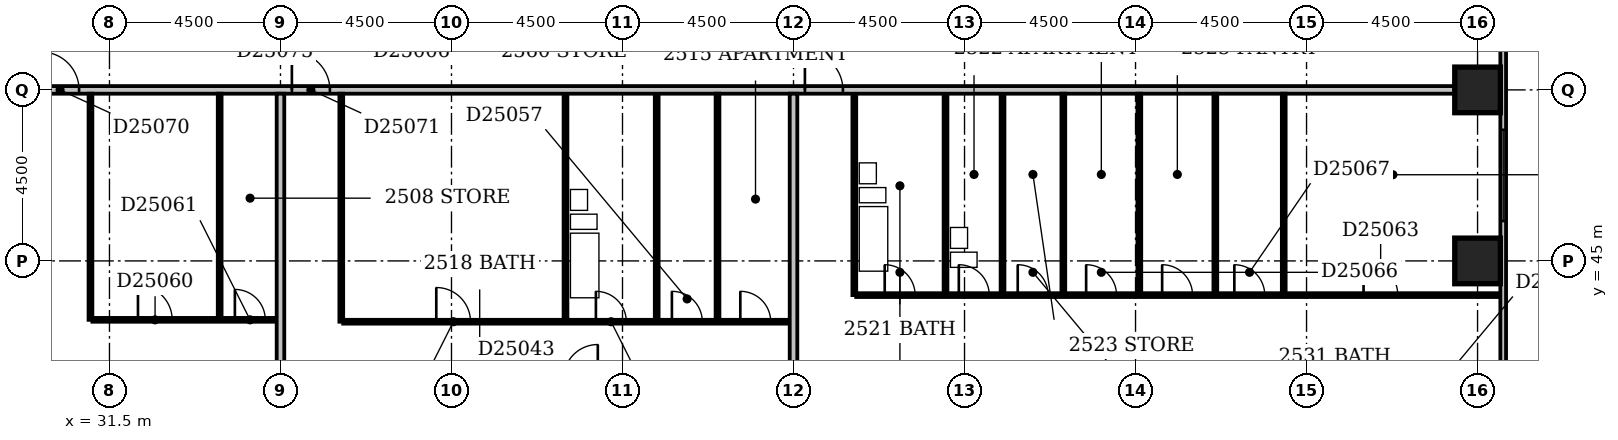
"""IFC4 building model, lengths in metres.
Left out: names, types, materials, properties, quantities, classifications, styles, units other than length and angle.
Written with IfcOpenShell. Run it as: python <this file> out.ifc"""

import sys

from ifc_helpers import new_model, si_unit, direction, frame, frame_2d, origin, origin_2d, place, context, subcontext, project, spatial, rectangle, extrude, element, fill, save


model = new_model("IFC4")
c1 = context("Model", 3, precision=1e-05, world=origin(), true_north=direction((0.0, 1.0)))
c2 = subcontext(c1, "Body", "Model", "MODEL_VIEW")
j1 = project(units=[si_unit("LENGTHUNIT", "METRE"), si_unit("PLANEANGLEUNIT", "RADIAN")], contexts=[c1])
p1 = place(None, origin())
s1 = spatial("IfcSite", under=j1, at=p1, CompositionType="ELEMENT")
p2 = place(p1, origin())
s2 = spatial("IfcBuilding", under=s1, at=p2, CompositionType="ELEMENT")
p3 = place(p2, frame((0.0, 0.0, 101.0)))
s3 = spatial("IfcBuildingStorey", under=s2, at=p3, CompositionType="ELEMENT", Elevation=101.0)
for number, where, z_axis, x_axis in (
    (1, (67.5, 45.0, -0.3), (0.0, 0.0, 1.0), (1.0, 0.0, 0.0)),
    (2, (67.5, 49.5, -0.3), (0.0, 0.0, 1.0), (1.0, 0.0, 0.0)),
):
    element("IfcColumn", number, at=place(p3, frame(where, z_axis=z_axis, x_axis=x_axis)), inside=s3, PredefinedType="COLUMN", context=c2, shape_type="SweptSolid", body=[
        extrude(rectangle(XDim=1.2, YDim=1.2, at=origin_2d()), origin(), (0.0, 0.0, 1.0), 3.6),
    ])
p4 = place(p3, frame((68.175, 35.4, 0.0), z_axis=(0.0, 0.0, 1.0), x_axis=(0.0, 1.0, 0.0)))
e3 = element("IfcWall", 3, at=p4, inside=s3, PredefinedType="STANDARD", context=c2, shape_type="SweptSolid", body=[
    extrude(rectangle(XDim=23.85, YDim=0.15, at=frame_2d((11.925, 0.0))), origin(), (0.0, 0.0, 1.0), 2.7),
])
p5 = place(p4, frame((1.65, 0.0, 0.6)))
e4 = element("IfcOpeningElement", 4, at=p5, cuts=e3, PredefinedType="OPENING", context=c2, shape_type="SweptSolid", body=[
    extrude(rectangle(XDim=2.4, YDim=1.8, at=frame_2d((1.2, 0.9))), frame((0.0, 0.087, 0.0), z_axis=(0.0, -1.0, 0.0), x_axis=(1.0, 0.0, 0.0)), (0.0, 0.0, 1.0), 0.174),
])
p6 = place(p4, frame((10.65, 0.0, 0.6)))
e5 = element("IfcOpeningElement", 5, at=p6, cuts=e3, PredefinedType="OPENING", context=c2, shape_type="SweptSolid", body=[
    extrude(rectangle(XDim=2.4, YDim=1.8, at=frame_2d((1.2, 0.9))), frame((0.0, 0.087, 0.0), z_axis=(0.0, -1.0, 0.0), x_axis=(1.0, 0.0, 0.0)), (0.0, 0.0, 1.0), 0.174),
])
p7 = place(p4, frame((20.653, 0.0, 0.6)))
e6 = element("IfcOpeningElement", 6, at=p7, cuts=e3, PredefinedType="OPENING", context=c2, shape_type="SweptSolid", body=[
    extrude(rectangle(XDim=1.5, YDim=1.8, at=frame_2d((0.75, 0.9))), frame((0.0, 0.087, 0.0), z_axis=(0.0, -1.0, 0.0), x_axis=(1.0, 0.0, 0.0)), (0.0, 0.0, 1.0), 0.174),
])
p8 = place(p3, frame((36.0, 36.6, 0.0), z_axis=(0.0, 0.0, 1.0), x_axis=(0.0, 1.0, 0.0)))
e7 = element("IfcWall", 7, at=p8, inside=s3, PredefinedType="PARTITIONING", context=c2, shape_type="SweptSolid", body=[
    extrude(rectangle(XDim=12.8, YDim=0.2, at=frame_2d((6.4, 0.0))), origin(), (0.0, 0.0, 1.0), 2.4),
])
p9 = place(p3, frame((49.5, 36.6, 0.0), z_axis=(0.0, 0.0, 1.0), x_axis=(0.0, 1.0, 0.0)))
e8 = element("IfcWall", 8, at=p9, inside=s3, PredefinedType="PARTITIONING", context=c2, shape_type="SweptSolid", body=[
    extrude(rectangle(XDim=12.8, YDim=0.2, at=frame_2d((6.4, 0.0))), origin(), (0.0, 0.0, 1.0), 3.3),
])
p10 = place(p3, frame((37.6, 43.4, 0.0), z_axis=(0.0, 0.0, 1.0), x_axis=(0.0, 1.0, 0.0)))
e9 = element("IfcWall", 9, at=p10, inside=s3, PredefinedType="PARTITIONING", context=c2, shape_type="SweptSolid", body=[
    extrude(rectangle(XDim=6.0, YDim=0.1, at=frame_2d((3.0, 0.0))), origin(), (0.0, 0.0, 1.0), 3.3),
])
p11 = place(p3, frame((37.65, 43.4, 0.0), z_axis=(0.0, 0.0, 1.0), x_axis=(1.0, 0.0, 0.0)))
e10 = element("IfcWall", 10, at=p11, inside=s3, PredefinedType="PARTITIONING", context=c2, shape_type="SweptSolid", body=[
    extrude(rectangle(XDim=11.75, YDim=0.1, at=frame_2d((5.875, 0.0))), origin(), (0.0, 0.0, 1.0), 3.3),
])
p12 = place(p11, frame((6.65, 0.0, 0.0)))
e11 = element("IfcOpeningElement", 11, at=p12, cuts=e10, PredefinedType="OPENING", context=c2, shape_type="SweptSolid", body=[
    extrude(rectangle(XDim=0.8, YDim=2.1, at=frame_2d((0.4, 1.05))), frame((0.0, 0.062, 0.0), z_axis=(0.0, -1.0, 0.0), x_axis=(1.0, 0.0, 0.0)), (0.0, 0.0, 1.0), 0.124),
])
p13 = place(p11, frame((2.45, 0.0, 0.0)))
e12 = element("IfcOpeningElement", 12, at=p13, cuts=e10, PredefinedType="OPENING", context=c2, shape_type="SweptSolid", body=[
    extrude(rectangle(XDim=0.9, YDim=2.1, at=frame_2d((0.45, 1.05))), frame((0.0, 0.062, 0.0), z_axis=(0.0, -1.0, 0.0), x_axis=(1.0, 0.0, 0.0)), (0.0, 0.0, 1.0), 0.124),
])
p14 = place(p11, frame((8.65, 0.0, 0.0)))
e13 = element("IfcOpeningElement", 13, at=p14, cuts=e10, PredefinedType="OPENING", context=c2, shape_type="SweptSolid", body=[
    extrude(rectangle(XDim=0.8, YDim=2.1, at=frame_2d((0.4, 1.05))), frame((0.0, 0.062, 0.0), z_axis=(0.0, -1.0, 0.0), x_axis=(1.0, 0.0, 0.0)), (0.0, 0.0, 1.0), 0.124),
])
p15 = place(p11, frame((10.45, 0.0, 0.0)))
e14 = element("IfcOpeningElement", 14, at=p15, cuts=e10, PredefinedType="OPENING", context=c2, shape_type="SweptSolid", body=[
    extrude(rectangle(XDim=0.8, YDim=2.1, at=frame_2d((0.4, 1.05))), frame((0.0, 0.062, 0.0), z_axis=(0.0, -1.0, 0.0), x_axis=(1.0, 0.0, 0.0)), (0.0, 0.0, 1.0), 0.124),
])
p16 = place(p3, frame((31.0, 43.45, 0.0), z_axis=(0.0, 0.0, 1.0), x_axis=(0.0, 1.0, 0.0)))
e15 = element("IfcWall", 15, at=p16, inside=s3, PredefinedType="PARTITIONING", context=c2, shape_type="SweptSolid", body=[
    extrude(rectangle(XDim=5.95, YDim=0.1, at=frame_2d((2.975, 0.0))), origin(), (0.0, 0.0, 1.0), 3.3),
])
p17 = place(p3, frame((31.05, 43.45, 0.0), z_axis=(0.0, 0.0, 1.0), x_axis=(1.0, 0.0, 0.0)))
e16 = element("IfcWall", 16, at=p17, inside=s3, PredefinedType="PARTITIONING", context=c2, shape_type="SweptSolid", body=[
    extrude(rectangle(XDim=4.85, YDim=0.1, at=frame_2d((2.425, 0.0))), origin(), (0.0, 0.0, 1.0), 3.3),
])
p18 = place(p17, frame((1.2, 0.0, 0.0)))
e17 = element("IfcOpeningElement", 17, at=p18, cuts=e16, PredefinedType="OPENING", context=c2, shape_type="SweptSolid", body=[
    extrude(rectangle(XDim=0.9, YDim=2.1, at=frame_2d((0.45, 1.05))), frame((0.0, 0.062, 0.0), z_axis=(0.0, -1.0, 0.0), x_axis=(1.0, 0.0, 0.0)), (0.0, 0.0, 1.0), 0.124),
])
p19 = place(p17, frame((3.75, 0.0, 0.0)))
e18 = element("IfcOpeningElement", 18, at=p19, cuts=e16, PredefinedType="OPENING", context=c2, shape_type="SweptSolid", body=[
    extrude(rectangle(XDim=0.8, YDim=2.1, at=frame_2d((0.4, 1.05))), frame((0.0, 0.062, 0.0), z_axis=(0.0, -1.0, 0.0), x_axis=(1.0, 0.0, 0.0)), (0.0, 0.0, 1.0), 0.124),
])
for number, where, z_axis, x_axis in (
    (19, (43.5, 43.45, 0.0), (0.0, 0.0, 1.0), (0.0, 1.0, 0.0)),
    (20, (45.9, 43.45, 0.0), (0.0, 0.0, 1.0), (0.0, 1.0, 0.0)),
):
    element("IfcWall", number, at=place(p3, frame(where, z_axis=z_axis, x_axis=x_axis)), inside=s3, PredefinedType="PLUMBINGWALL", context=c2, shape_type="SweptSolid", body=[
        extrude(rectangle(XDim=5.95, YDim=0.1, at=frame_2d((2.975, 0.0))), origin(), (0.0, 0.0, 1.0), 3.3),
    ])
p20 = place(p3, frame((47.5, 43.45, 0.0), z_axis=(0.0, 0.0, 1.0), x_axis=(0.0, 1.0, 0.0)))
e21 = element("IfcWall", 21, at=p20, inside=s3, PredefinedType="PARTITIONING", context=c2, shape_type="SweptSolid", body=[
    extrude(rectangle(XDim=5.95, YDim=0.1, at=frame_2d((2.975, 0.0))), origin(), (0.0, 0.0, 1.0), 3.3),
])
p21 = place(p3, frame((34.4, 43.5, 0.0), z_axis=(0.0, 0.0, 1.0), x_axis=(0.0, 1.0, 0.0)))
e22 = element("IfcWall", 22, at=p21, inside=s3, PredefinedType="PARTITIONING", context=c2, shape_type="SweptSolid", body=[
    extrude(rectangle(XDim=5.9, YDim=0.1, at=frame_2d((2.95, 0.0))), origin(), (0.0, 0.0, 1.0), 3.3),
])
p22 = place(p3, frame((51.1, 44.1, 0.0), z_axis=(0.0, 0.0, 1.0), x_axis=(0.0, 1.0, 0.0)))
e23 = element("IfcWall", 23, at=p22, inside=s3, PredefinedType="PLUMBINGWALL", context=c2, shape_type="SweptSolid", body=[
    extrude(rectangle(XDim=5.3, YDim=0.1, at=frame_2d((2.65, 0.0))), origin(), (0.0, 0.0, 1.0), 3.3),
])
p23 = place(p3, frame((51.15, 44.1, 0.0), z_axis=(0.0, 0.0, 1.0), x_axis=(1.0, 0.0, 0.0)))
e24 = element("IfcWall", 24, at=p23, inside=s3, PredefinedType="PARTITIONING", context=c2, shape_type="SweptSolid", body=[
    extrude(rectangle(XDim=16.95, YDim=0.1, at=frame_2d((8.475, 0.0))), origin(), (0.0, 0.0, 1.0), 3.3),
])
p24 = place(p23, frame((0.75, 0.0, 0.0)))
e25 = element("IfcOpeningElement", 25, at=p24, cuts=e24, PredefinedType="OPENING", context=c2, shape_type="SweptSolid", body=[
    extrude(rectangle(XDim=0.8, YDim=2.1, at=frame_2d((0.4, 1.05))), frame((0.0, 0.062, 0.0), z_axis=(0.0, -1.0, 0.0), x_axis=(1.0, 0.0, 0.0)), (0.0, 0.0, 1.0), 0.124),
])
p25 = place(p23, frame((13.35, 0.0, 0.0)))
e26 = element("IfcOpeningElement", 26, at=p25, cuts=e24, PredefinedType="OPENING", context=c2, shape_type="SweptSolid", body=[
    extrude(rectangle(XDim=0.9, YDim=2.1, at=frame_2d((0.45, 1.05))), frame((0.0, 0.062, 0.0), z_axis=(0.0, -1.0, 0.0), x_axis=(1.0, 0.0, 0.0)), (0.0, 0.0, 1.0), 0.124),
])
p26 = place(p23, frame((8.05, 0.0, 0.0)))
e27 = element("IfcOpeningElement", 27, at=p26, cuts=e24, PredefinedType="OPENING", context=c2, shape_type="SweptSolid", body=[
    extrude(rectangle(XDim=0.8, YDim=2.1, at=frame_2d((0.4, 1.05))), frame((0.0, 0.062, 0.0), z_axis=(0.0, -1.0, 0.0), x_axis=(1.0, 0.0, 0.0)), (0.0, 0.0, 1.0), 0.124),
])
p27 = place(p23, frame((4.25, 0.0, 0.0)))
e28 = element("IfcOpeningElement", 28, at=p27, cuts=e24, PredefinedType="OPENING", context=c2, shape_type="SweptSolid", body=[
    extrude(rectangle(XDim=0.8, YDim=2.1, at=frame_2d((0.4, 1.05))), frame((0.0, 0.062, 0.0), z_axis=(0.0, -1.0, 0.0), x_axis=(1.0, 0.0, 0.0)), (0.0, 0.0, 1.0), 0.124),
])
p28 = place(p23, frame((6.05, 0.0, 0.0)))
e29 = element("IfcOpeningElement", 29, at=p28, cuts=e24, PredefinedType="OPENING", context=c2, shape_type="SweptSolid", body=[
    extrude(rectangle(XDim=0.8, YDim=2.1, at=frame_2d((0.4, 1.05))), frame((0.0, 0.062, 0.0), z_axis=(0.0, -1.0, 0.0), x_axis=(1.0, 0.0, 0.0)), (0.0, 0.0, 1.0), 0.124),
])
p29 = place(p23, frame((9.95, 0.0, 0.0)))
e30 = element("IfcOpeningElement", 30, at=p29, cuts=e24, PredefinedType="OPENING", context=c2, shape_type="SweptSolid", body=[
    extrude(rectangle(XDim=0.8, YDim=2.1, at=frame_2d((0.4, 1.05))), frame((0.0, 0.062, 0.0), z_axis=(0.0, -1.0, 0.0), x_axis=(1.0, 0.0, 0.0)), (0.0, 0.0, 1.0), 0.124),
])
p30 = place(p23, frame((2.7, 0.0, 0.0)))
e31 = element("IfcOpeningElement", 31, at=p30, cuts=e24, PredefinedType="OPENING", context=c2, shape_type="SweptSolid", body=[
    extrude(rectangle(XDim=0.8, YDim=2.1, at=frame_2d((0.4, 1.05))), frame((0.0, 0.062, 0.0), z_axis=(0.0, -1.0, 0.0), x_axis=(1.0, 0.0, 0.0)), (0.0, 0.0, 1.0), 0.124),
])
p31 = place(p3, frame((53.5, 44.15, 0.0), z_axis=(0.0, 0.0, 1.0), x_axis=(0.0, 1.0, 0.0)))
e32 = element("IfcWall", 32, at=p31, inside=s3, PredefinedType="PLUMBINGWALL", context=c2, shape_type="SweptSolid", body=[
    extrude(rectangle(XDim=5.25, YDim=0.1, at=frame_2d((2.625, 0.0))), origin(), (0.0, 0.0, 1.0), 2.6),
])
p32 = place(p3, frame((55.0, 44.15, 0.0), z_axis=(0.0, 0.0, 1.0), x_axis=(0.0, 1.0, 0.0)))
e33 = element("IfcWall", 33, at=p32, inside=s3, PredefinedType="PLUMBINGWALL", context=c2, shape_type="SweptSolid", body=[
    extrude(rectangle(XDim=5.25, YDim=0.1, at=frame_2d((2.625, 0.0))), origin(), (0.0, 0.0, 1.0), 3.3),
])
for number, where, z_axis, x_axis in (
    (34, (56.6, 44.15, 0.0), (0.0, 0.0, 1.0), (0.0, 1.0, 0.0)),
    (35, (58.6, 44.15, 0.0), (0.0, 0.0, 1.0), (0.0, 1.0, 0.0)),
    (36, (60.6, 44.15, 0.0), (0.0, 0.0, 1.0), (0.0, 1.0, 0.0)),
):
    element("IfcWall", number, at=place(p3, frame(where, z_axis=z_axis, x_axis=x_axis)), inside=s3, PredefinedType="PARTITIONING", context=c2, shape_type="SweptSolid", body=[
        extrude(rectangle(XDim=5.25, YDim=0.1, at=frame_2d((2.625, 0.0))), origin(), (0.0, 0.0, 1.0), 3.3),
    ])
p33 = place(p3, frame((62.4, 44.15, 0.0), z_axis=(0.0, 0.0, 1.0), x_axis=(0.0, 1.0, 0.0)))
e37 = element("IfcWall", 37, at=p33, inside=s3, PredefinedType="PARTITIONING", context=c2, shape_type="SweptSolid", body=[
    extrude(rectangle(XDim=5.25, YDim=0.1, at=frame_2d((2.625, 0.0))), origin(), (0.0, 0.0, 1.0), 2.4),
])
p34 = place(p3, frame((9.1, 49.5, 0.0), z_axis=(0.0, 0.0, 1.0), x_axis=(1.0, 0.0, 0.0)))
e38 = element("IfcWall", 38, at=p34, inside=s3, PredefinedType="PARTITIONING", context=c2, shape_type="SweptSolid", body=[
    extrude(rectangle(XDim=57.8, YDim=0.2, at=frame_2d((28.9, 0.0))), origin(), (0.0, 0.0, 1.0), 3.3),
])
p35 = place(p34, frame((14.95, 0.0, 0.0)))
e39 = element("IfcOpeningElement", 39, at=p35, cuts=e38, PredefinedType="OPENING", context=c2, shape_type="SweptSolid", body=[
    extrude(rectangle(XDim=1.0, YDim=2.1, at=frame_2d((0.5, 1.05))), frame((0.0, 0.112, 0.0), z_axis=(0.0, -1.0, 0.0), x_axis=(1.0, 0.0, 0.0)), (0.0, 0.0, 1.0), 0.224),
])
p36 = place(p34, frame((20.6, 0.0, 0.0)))
e40 = element("IfcOpeningElement", 40, at=p36, cuts=e38, PredefinedType="OPENING", context=c2, shape_type="SweptSolid", body=[
    extrude(rectangle(XDim=1.0, YDim=2.1, at=frame_2d((0.5, 1.05))), frame((0.0, 0.112, 0.0), z_axis=(0.0, -1.0, 0.0), x_axis=(1.0, 0.0, 0.0)), (0.0, 0.0, 1.0), 0.224),
])
p37 = place(p34, frame((27.2, 0.0, 0.0)))
e41 = element("IfcOpeningElement", 41, at=p37, cuts=e38, PredefinedType="OPENING", context=c2, shape_type="SweptSolid", body=[
    extrude(rectangle(XDim=1.0, YDim=2.1, at=frame_2d((0.5, 1.05))), frame((0.0, 0.112, 0.0), z_axis=(0.0, -1.0, 0.0), x_axis=(1.0, 0.0, 0.0)), (0.0, 0.0, 1.0), 0.224),
])
p38 = place(p34, frame((40.7, 0.0, 0.0)))
e42 = element("IfcOpeningElement", 42, at=p38, cuts=e38, PredefinedType="OPENING", context=c2, shape_type="SweptSolid", body=[
    extrude(rectangle(XDim=1.0, YDim=2.1, at=frame_2d((0.5, 1.05))), frame((0.0, 0.112, 0.0), z_axis=(0.0, -1.0, 0.0), x_axis=(1.0, 0.0, 0.0)), (0.0, 0.0, 1.0), 0.224),
])
p39 = place(p34, frame((10.65, 0.0, 0.0)))
e43 = element("IfcOpeningElement", 43, at=p39, cuts=e38, PredefinedType="OPENING", context=c2, shape_type="SweptSolid", body=[
    extrude(rectangle(XDim=0.9, YDim=2.1, at=frame_2d((0.45, 1.05))), frame((0.0, 0.112, 0.0), z_axis=(0.0, -1.0, 0.0), x_axis=(1.0, 0.0, 0.0)), (0.0, 0.0, 1.0), 0.224),
])
p40 = place(p6, origin())
e44 = element("IfcWindow", 44, at=p40, inside=s3, PartitioningType="SINGLE_PANEL", PredefinedType="WINDOW", context=c2, shape_type="SweptSolid", body=[
    extrude(rectangle(XDim=2.4, YDim=1.8, at=frame_2d((1.2, 0.9))), frame((0.0, 0.03, 0.0), z_axis=(0.0, -1.0, 0.0), x_axis=(1.0, 0.0, 0.0)), (0.0, 0.0, 1.0), 0.06),
])
fill(e5, e44)
p41 = place(p12, origin())
e45 = element("IfcDoor", 45, at=p41, inside=s3, OperationType="SINGLE_SWING_LEFT", PredefinedType="DOOR", context=c2, shape_type="SweptSolid", body=[
    extrude(rectangle(XDim=0.8, YDim=2.1, at=frame_2d((0.4, 1.05))), frame((0.0, 0.025, 0.0), z_axis=(0.0, -1.0, 0.0), x_axis=(1.0, 0.0, 0.0)), (0.0, 0.0, 1.0), 0.05),
])
fill(e11, e45)
p42 = place(p13, origin())
e46 = element("IfcDoor", 46, at=p42, inside=s3, OperationType="SINGLE_SWING_LEFT", PredefinedType="DOOR", context=c2, shape_type="SweptSolid", body=[
    extrude(rectangle(XDim=0.9, YDim=2.1, at=frame_2d((0.45, 1.05))), frame((0.0, 0.025, 0.0), z_axis=(0.0, -1.0, 0.0), x_axis=(1.0, 0.0, 0.0)), (0.0, 0.0, 1.0), 0.05),
])
fill(e12, e46)
p43 = place(p14, origin())
e47 = element("IfcDoor", 47, at=p43, inside=s3, OperationType="SINGLE_SWING_LEFT", PredefinedType="DOOR", context=c2, shape_type="SweptSolid", body=[
    extrude(rectangle(XDim=0.8, YDim=2.1, at=frame_2d((0.4, 1.05))), frame((0.0, 0.025, 0.0), z_axis=(0.0, -1.0, 0.0), x_axis=(1.0, 0.0, 0.0)), (0.0, 0.0, 1.0), 0.05),
])
fill(e13, e47)
p44 = place(p15, origin())
e48 = element("IfcDoor", 48, at=p44, inside=s3, OperationType="SINGLE_SWING_LEFT", PredefinedType="DOOR", context=c2, shape_type="SweptSolid", body=[
    extrude(rectangle(XDim=0.8, YDim=2.1, at=frame_2d((0.4, 1.05))), frame((0.0, 0.025, 0.0), z_axis=(0.0, -1.0, 0.0), x_axis=(1.0, 0.0, 0.0)), (0.0, 0.0, 1.0), 0.05),
])
fill(e14, e48)
p45 = place(p18, origin())
e49 = element("IfcDoor", 49, at=p45, inside=s3, OperationType="SINGLE_SWING_LEFT", PredefinedType="DOOR", context=c2, shape_type="SweptSolid", body=[
    extrude(rectangle(XDim=0.9, YDim=2.1, at=frame_2d((0.45, 1.05))), frame((0.0, 0.025, 0.0), z_axis=(0.0, -1.0, 0.0), x_axis=(1.0, 0.0, 0.0)), (0.0, 0.0, 1.0), 0.05),
])
fill(e17, e49)
p46 = place(p19, origin())
e50 = element("IfcDoor", 50, at=p46, inside=s3, OperationType="SINGLE_SWING_LEFT", PredefinedType="DOOR", context=c2, shape_type="SweptSolid", body=[
    extrude(rectangle(XDim=0.8, YDim=2.1, at=frame_2d((0.4, 1.05))), frame((0.0, 0.025, 0.0), z_axis=(0.0, -1.0, 0.0), x_axis=(1.0, 0.0, 0.0)), (0.0, 0.0, 1.0), 0.05),
])
fill(e18, e50)
p47 = place(p24, origin())
e51 = element("IfcDoor", 51, at=p47, inside=s3, OperationType="SINGLE_SWING_LEFT", PredefinedType="DOOR", context=c2, shape_type="SweptSolid", body=[
    extrude(rectangle(XDim=0.8, YDim=2.1, at=frame_2d((0.4, 1.05))), frame((0.0, 0.025, 0.0), z_axis=(0.0, -1.0, 0.0), x_axis=(1.0, 0.0, 0.0)), (0.0, 0.0, 1.0), 0.05),
])
fill(e25, e51)
p48 = place(p25, origin())
e52 = element("IfcDoor", 52, at=p48, inside=s3, OperationType="SINGLE_SWING_LEFT", PredefinedType="DOOR", context=c2, shape_type="SweptSolid", body=[
    extrude(rectangle(XDim=0.9, YDim=2.1, at=frame_2d((0.45, 1.05))), frame((0.0, 0.025, 0.0), z_axis=(0.0, -1.0, 0.0), x_axis=(1.0, 0.0, 0.0)), (0.0, 0.0, 1.0), 0.05),
])
fill(e26, e52)
p49 = place(p26, origin())
e53 = element("IfcDoor", 53, at=p49, inside=s3, OperationType="SINGLE_SWING_LEFT", PredefinedType="DOOR", context=c2, shape_type="SweptSolid", body=[
    extrude(rectangle(XDim=0.8, YDim=2.1, at=frame_2d((0.4, 1.05))), frame((0.0, 0.025, 0.0), z_axis=(0.0, -1.0, 0.0), x_axis=(1.0, 0.0, 0.0)), (0.0, 0.0, 1.0), 0.05),
])
fill(e27, e53)
p50 = place(p27, origin())
e54 = element("IfcDoor", 54, at=p50, inside=s3, OperationType="SINGLE_SWING_LEFT", PredefinedType="DOOR", context=c2, shape_type="SweptSolid", body=[
    extrude(rectangle(XDim=0.8, YDim=2.1, at=frame_2d((0.4, 1.05))), frame((0.0, 0.025, 0.0), z_axis=(0.0, -1.0, 0.0), x_axis=(1.0, 0.0, 0.0)), (0.0, 0.0, 1.0), 0.05),
])
fill(e28, e54)
p51 = place(p28, origin())
e55 = element("IfcDoor", 55, at=p51, inside=s3, OperationType="SINGLE_SWING_LEFT", PredefinedType="DOOR", context=c2, shape_type="SweptSolid", body=[
    extrude(rectangle(XDim=0.8, YDim=2.1, at=frame_2d((0.4, 1.05))), frame((0.0, 0.025, 0.0), z_axis=(0.0, -1.0, 0.0), x_axis=(1.0, 0.0, 0.0)), (0.0, 0.0, 1.0), 0.05),
])
fill(e29, e55)
p52 = place(p29, origin())
e56 = element("IfcDoor", 56, at=p52, inside=s3, OperationType="SINGLE_SWING_LEFT", PredefinedType="DOOR", context=c2, shape_type="SweptSolid", body=[
    extrude(rectangle(XDim=0.8, YDim=2.1, at=frame_2d((0.4, 1.05))), frame((0.0, 0.025, 0.0), z_axis=(0.0, -1.0, 0.0), x_axis=(1.0, 0.0, 0.0)), (0.0, 0.0, 1.0), 0.05),
])
fill(e30, e56)
p53 = place(p30, origin())
e57 = element("IfcDoor", 57, at=p53, inside=s3, OperationType="SINGLE_SWING_LEFT", PredefinedType="DOOR", context=c2, shape_type="SweptSolid", body=[
    extrude(rectangle(XDim=0.8, YDim=2.1, at=frame_2d((0.4, 1.05))), frame((0.0, 0.025, 0.0), z_axis=(0.0, -1.0, 0.0), x_axis=(1.0, 0.0, 0.0)), (0.0, 0.0, 1.0), 0.05),
])
fill(e31, e57)
p54 = place(p36, origin())
e58 = element("IfcDoor", 58, at=p54, inside=s3, OperationType="SINGLE_SWING_LEFT", PredefinedType="DOOR", context=c2, shape_type="SweptSolid", body=[
    extrude(rectangle(XDim=1.0, YDim=2.1, at=frame_2d((0.5, 1.05))), frame((0.0, 0.025, 0.0), z_axis=(0.0, -1.0, 0.0), x_axis=(1.0, 0.0, 0.0)), (0.0, 0.0, 1.0), 0.05),
])
fill(e40, e58)
p55 = place(p37, origin())
e59 = element("IfcDoor", 59, at=p55, inside=s3, OperationType="SINGLE_SWING_LEFT", PredefinedType="DOOR", context=c2, shape_type="SweptSolid", body=[
    extrude(rectangle(XDim=1.0, YDim=2.1, at=frame_2d((0.5, 1.05))), frame((0.0, 0.025, 0.0), z_axis=(0.0, -1.0, 0.0), x_axis=(1.0, 0.0, 0.0)), (0.0, 0.0, 1.0), 0.05),
])
fill(e41, e59)
p56 = place(p38, origin())
e60 = element("IfcDoor", 60, at=p56, inside=s3, OperationType="SINGLE_SWING_LEFT", PredefinedType="DOOR", context=c2, shape_type="SweptSolid", body=[
    extrude(rectangle(XDim=1.0, YDim=2.1, at=frame_2d((0.5, 1.05))), frame((0.0, 0.025, 0.0), z_axis=(0.0, -1.0, 0.0), x_axis=(1.0, 0.0, 0.0)), (0.0, 0.0, 1.0), 0.05),
])
fill(e42, e60)
save(model, sys.argv[1])
